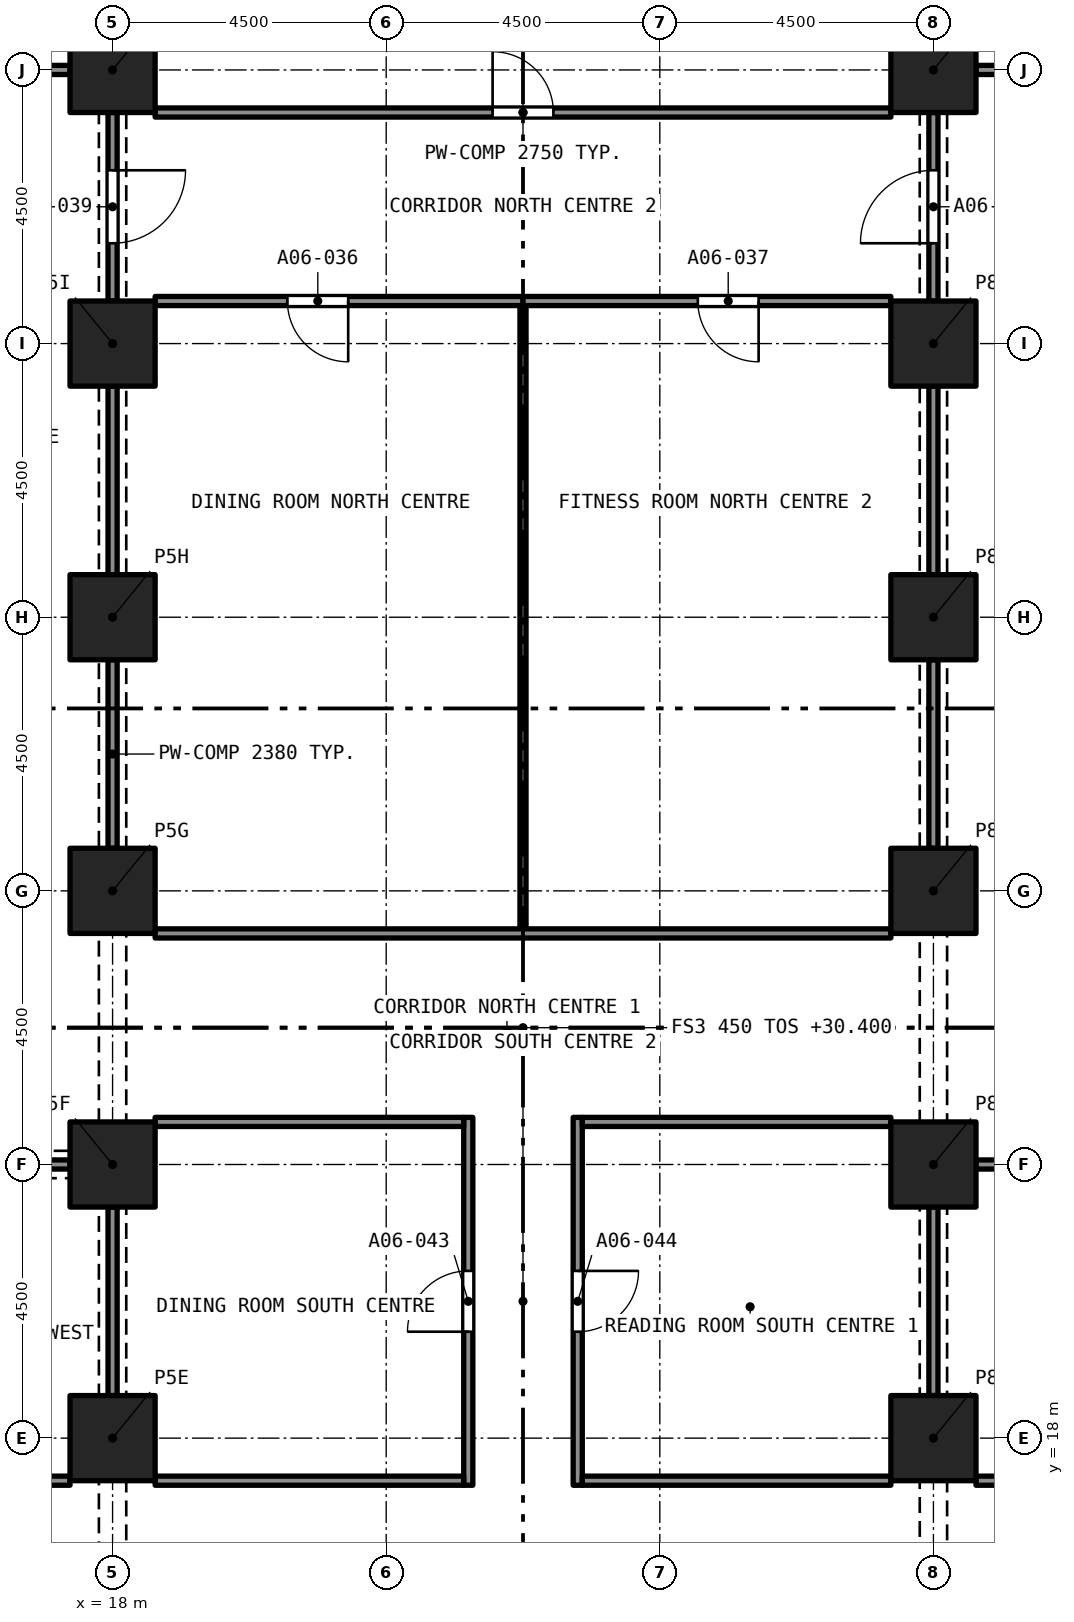
"""IFC4 building model, lengths in metres.
Left out: names, types, materials, properties, quantities, classifications, styles, units other than length and angle.
Written with IfcOpenShell. Run it as: python <this file> out.ifc"""

import sys

from ifc_helpers import new_model, si_unit, direction, frame, frame_2d, origin, origin_2d, place, context, subcontext, project, spatial, rectangle, extrude, element, fill, save


model = new_model("IFC4")
c1 = context("Model", 3, precision=1e-05, world=origin(), true_north=direction((0.0, 1.0)))
c2 = subcontext(c1, "Body", "Model", "MODEL_VIEW")
j1 = project(units=[si_unit("LENGTHUNIT", "METRE"), si_unit("PLANEANGLEUNIT", "RADIAN")], contexts=[c1])
p1 = place(None, origin())
s1 = spatial("IfcSite", under=j1, at=p1, CompositionType="ELEMENT")
p2 = place(p1, origin())
s2 = spatial("IfcBuilding", under=s1, at=p2, CompositionType="ELEMENT")
p3 = place(p2, frame((0.0, 0.0, 30.4)))
s3 = spatial("IfcBuildingStorey", under=s2, at=p3, CompositionType="ELEMENT", Elevation=30.4)
for number, where, z_axis, x_axis in (
    (1, (18.0, 18.0, 0.0), (0.0, 0.0, 1.0), (1.0, 0.0, 0.0)),
    (2, (31.5, 18.0, 0.0), (0.0, 0.0, 1.0), (1.0, 0.0, 0.0)),
    (3, (18.0, 22.5, 0.0), (0.0, 0.0, 1.0), (1.0, 0.0, 0.0)),
    (4, (31.5, 22.5, 0.0), (0.0, 0.0, 1.0), (1.0, 0.0, 0.0)),
    (5, (18.0, 27.0, 0.0), (0.0, 0.0, 1.0), (1.0, 0.0, 0.0)),
    (6, (31.5, 27.0, 0.0), (0.0, 0.0, 1.0), (1.0, 0.0, 0.0)),
    (7, (18.0, 31.5, 0.0), (0.0, 0.0, 1.0), (1.0, 0.0, 0.0)),
    (8, (31.5, 31.5, 0.0), (0.0, 0.0, 1.0), (1.0, 0.0, 0.0)),
    (9, (18.0, 36.0, 0.0), (0.0, 0.0, 1.0), (1.0, 0.0, 0.0)),
    (10, (31.5, 36.0, 0.0), (0.0, 0.0, 1.0), (1.0, 0.0, 0.0)),
    (11, (18.0, 40.5, 0.0), (0.0, 0.0, 1.0), (1.0, 0.0, 0.0)),
    (12, (31.5, 40.5, 0.0), (0.0, 0.0, 1.0), (1.0, 0.0, 0.0)),
):
    element("IfcColumn", number, at=place(p3, frame(where, z_axis=z_axis, x_axis=x_axis)), inside=s3, PredefinedType="COLUMN", context=c2, shape_type="SweptSolid", body=[
        extrude(rectangle(XDim=1.4, YDim=1.4, at=origin_2d()), origin(), (0.0, 0.0, 1.0), 3.2),
    ])
p4 = place(p3, frame((13.5, 40.5, 0.0), z_axis=(0.0, 0.0, 1.0), x_axis=(1.0, 0.0, 0.0)))
e13 = element("IfcWall", 13, at=p4, inside=s3, PredefinedType="PARTITIONING", context=c2, shape_type="SweptSolid", body=[
    extrude(rectangle(XDim=3.8, YDim=0.15, at=frame_2d((1.9, 0.0))), origin(), (0.0, 0.0, 1.0), 2.9),
])
p5 = place(p3, frame((32.2, 40.5, 0.0), z_axis=(0.0, 0.0, 1.0), x_axis=(1.0, 0.0, 0.0)))
e14 = element("IfcWall", 14, at=p5, inside=s3, PredefinedType="PARTITIONING", context=c2, shape_type="SweptSolid", body=[
    extrude(rectangle(XDim=2.225, YDim=0.15, at=frame_2d((1.113, 0.0))), origin(), (0.0, 0.0, 1.0), 2.9),
])
p6 = place(p5, frame((1.05, 0.0, 0.0)))
e15 = element("IfcOpeningElement", 15, at=p6, cuts=e14, PredefinedType="OPENING", context=c2, shape_type="SweptSolid", body=[
    extrude(rectangle(XDim=1.0, YDim=2.1, at=frame_2d((0.5, 1.05))), frame((0.0, 0.085, 0.0), z_axis=(0.0, -1.0, 0.0), x_axis=(1.0, 0.0, 0.0)), (0.0, 0.0, 1.0), 0.17),
])
p7 = place(p3, frame((18.7, 39.8, 0.0), z_axis=(0.0, 0.0, 1.0), x_axis=(1.0, 0.0, 0.0)))
e16 = element("IfcWall", 16, at=p7, inside=s3, PredefinedType="PARTITIONING", context=c2, shape_type="SweptSolid", body=[
    extrude(rectangle(XDim=12.1, YDim=0.15, at=frame_2d((6.05, 0.0))), origin(), (0.0, 0.0, 1.0), 2.75),
])
p8 = place(p7, frame((5.55, 0.0, 0.0)))
e17 = element("IfcOpeningElement", 17, at=p8, cuts=e16, PredefinedType="OPENING", context=c2, shape_type="SweptSolid", body=[
    extrude(rectangle(XDim=1.0, YDim=2.1, at=frame_2d((0.5, 1.05))), frame((0.0, 0.085, 0.0), z_axis=(0.0, -1.0, 0.0), x_axis=(1.0, 0.0, 0.0)), (0.0, 0.0, 1.0), 0.17),
])
p9 = place(p3, frame((24.75, 36.7, 0.0), z_axis=(0.0, 0.0, 1.0), x_axis=(-1.0, 0.0, 0.0)))
e18 = element("IfcWall", 18, at=p9, inside=s3, PredefinedType="PARTITIONING", context=c2, shape_type="SweptSolid", body=[
    extrude(rectangle(XDim=6.05, YDim=0.15, at=frame_2d((3.025, 0.0))), origin(), (0.0, 0.0, 1.0), 2.75),
])
p10 = place(p9, frame((2.875, 0.0, 0.0)))
e19 = element("IfcOpeningElement", 19, at=p10, cuts=e18, PredefinedType="OPENING", context=c2, shape_type="SweptSolid", body=[
    extrude(rectangle(XDim=1.0, YDim=2.1, at=frame_2d((0.5, 1.05))), frame((0.0, 0.085, 0.0), z_axis=(0.0, -1.0, 0.0), x_axis=(1.0, 0.0, 0.0)), (0.0, 0.0, 1.0), 0.17),
])
p11 = place(p3, frame((30.8, 36.7, 0.0), z_axis=(0.0, 0.0, 1.0), x_axis=(-1.0, 0.0, 0.0)))
e20 = element("IfcWall", 20, at=p11, inside=s3, PredefinedType="PARTITIONING", context=c2, shape_type="SweptSolid", body=[
    extrude(rectangle(XDim=6.05, YDim=0.15, at=frame_2d((3.025, 0.0))), origin(), (0.0, 0.0, 1.0), 2.75),
])
p12 = place(p11, frame((2.175, 0.0, 0.0)))
e21 = element("IfcOpeningElement", 21, at=p12, cuts=e20, PredefinedType="OPENING", context=c2, shape_type="SweptSolid", body=[
    extrude(rectangle(XDim=1.0, YDim=2.1, at=frame_2d((0.5, 1.05))), frame((0.0, 0.085, 0.0), z_axis=(0.0, -1.0, 0.0), x_axis=(1.0, 0.0, 0.0)), (0.0, 0.0, 1.0), 0.17),
])
p13 = place(p3, frame((31.5, 36.7, 0.0), z_axis=(0.0, 0.0, 1.0), x_axis=(0.0, 1.0, 0.0)))
e22 = element("IfcWall", 22, at=p13, inside=s3, PredefinedType="PARTITIONING", context=c2, shape_type="SweptSolid", body=[
    extrude(rectangle(XDim=3.1, YDim=0.15, at=frame_2d((1.55, 0.0))), origin(), (0.0, 0.0, 1.0), 2.38),
])
p14 = place(p13, frame((0.95, 0.0, 0.0)))
e23 = element("IfcOpeningElement", 23, at=p14, cuts=e22, PredefinedType="OPENING", context=c2, shape_type="SweptSolid", body=[
    extrude(rectangle(XDim=1.2, YDim=2.1, at=frame_2d((0.6, 1.05))), frame((0.0, 0.085, 0.0), z_axis=(0.0, -1.0, 0.0), x_axis=(1.0, 0.0, 0.0)), (0.0, 0.0, 1.0), 0.17),
])
p15 = place(p3, frame((18.0, 39.8, 0.0), z_axis=(0.0, 0.0, 1.0), x_axis=(0.0, -1.0, 0.0)))
e24 = element("IfcWall", 24, at=p15, inside=s3, PredefinedType="PARTITIONING", context=c2, shape_type="SweptSolid", body=[
    extrude(rectangle(XDim=3.1, YDim=0.15, at=frame_2d((1.55, 0.0))), origin(), (0.0, 0.0, 1.0), 2.38),
])
p16 = place(p15, frame((0.95, 0.0, 0.0)))
e25 = element("IfcOpeningElement", 25, at=p16, cuts=e24, PredefinedType="OPENING", context=c2, shape_type="SweptSolid", body=[
    extrude(rectangle(XDim=1.2, YDim=2.1, at=frame_2d((0.6, 1.05))), frame((0.0, 0.085, 0.0), z_axis=(0.0, -1.0, 0.0), x_axis=(1.0, 0.0, 0.0)), (0.0, 0.0, 1.0), 0.17),
])
p17 = place(p3, frame((23.85, 17.225, 0.0), z_axis=(0.0, 0.0, 1.0), x_axis=(0.0, 1.0, 0.0)))
e26 = element("IfcWall", 26, at=p17, inside=s3, PredefinedType="PARTITIONING", context=c2, shape_type="SweptSolid", body=[
    extrude(rectangle(XDim=6.05, YDim=0.15, at=frame_2d((3.025, 0.0))), origin(), (0.0, 0.0, 1.0), 2.75),
])
p18 = place(p17, frame((2.525, 0.0, 0.0)))
e27 = element("IfcOpeningElement", 27, at=p18, cuts=e26, PredefinedType="OPENING", context=c2, shape_type="SweptSolid", body=[
    extrude(rectangle(XDim=1.0, YDim=2.1, at=frame_2d((0.5, 1.05))), frame((0.0, 0.085, 0.0), z_axis=(0.0, -1.0, 0.0), x_axis=(1.0, 0.0, 0.0)), (0.0, 0.0, 1.0), 0.17),
])
p19 = place(p3, frame((25.65, 23.275, 0.0), z_axis=(0.0, 0.0, 1.0), x_axis=(0.0, -1.0, 0.0)))
e28 = element("IfcWall", 28, at=p19, inside=s3, PredefinedType="PARTITIONING", context=c2, shape_type="SweptSolid", body=[
    extrude(rectangle(XDim=6.05, YDim=0.15, at=frame_2d((3.025, 0.0))), origin(), (0.0, 0.0, 1.0), 2.75),
])
p20 = place(p19, frame((2.525, 0.0, 0.0)))
e29 = element("IfcOpeningElement", 29, at=p20, cuts=e28, PredefinedType="OPENING", context=c2, shape_type="SweptSolid", body=[
    extrude(rectangle(XDim=1.0, YDim=2.1, at=frame_2d((0.5, 1.05))), frame((0.0, 0.085, 0.0), z_axis=(0.0, -1.0, 0.0), x_axis=(1.0, 0.0, 0.0)), (0.0, 0.0, 1.0), 0.17),
])
for number, where, z_axis, x_axis in (
    (30, (18.7, 17.3, 0.0), (0.0, 0.0, 1.0), (1.0, 0.0, 0.0)),
    (31, (25.725, 17.3, 0.0), (0.0, 0.0, 1.0), (1.0, 0.0, 0.0)),
):
    element("IfcWall", number, at=place(p3, frame(where, z_axis=z_axis, x_axis=x_axis)), inside=s3, PredefinedType="PARTITIONING", context=c2, shape_type="SweptSolid", body=[
        extrude(rectangle(XDim=5.075, YDim=0.15, at=frame_2d((2.538, 0.0))), origin(), (0.0, 0.0, 1.0), 2.75),
    ])
p21 = place(p3, frame((32.2, 17.3, 0.0), z_axis=(0.0, 0.0, 1.0), x_axis=(1.0, 0.0, 0.0)))
e32 = element("IfcWall", 32, at=p21, inside=s3, PredefinedType="PARTITIONING", context=c2, shape_type="SweptSolid", body=[
    extrude(rectangle(XDim=7.15, YDim=0.15, at=frame_2d((3.575, 0.0))), origin(), (0.0, 0.0, 1.0), 2.9),
])
p22 = place(p21, frame((2.775, 0.0, 0.0)))
e33 = element("IfcOpeningElement", 33, at=p22, cuts=e32, PredefinedType="OPENING", context=c2, shape_type="SweptSolid", body=[
    extrude(rectangle(XDim=0.9, YDim=2.1, at=frame_2d((0.45, 1.05))), frame((0.0, 0.085, 0.0), z_axis=(0.0, -1.0, 0.0), x_axis=(1.0, 0.0, 0.0)), (0.0, 0.0, 1.0), 0.17),
])
p23 = place(p3, frame((10.15, 17.3, 0.0), z_axis=(0.0, 0.0, 1.0), x_axis=(1.0, 0.0, 0.0)))
e34 = element("IfcWall", 34, at=p23, inside=s3, PredefinedType="PARTITIONING", context=c2, shape_type="SweptSolid", body=[
    extrude(rectangle(XDim=7.15, YDim=0.15, at=frame_2d((3.575, 0.0))), origin(), (0.0, 0.0, 1.0), 2.9),
])
p24 = place(p23, frame((3.475, 0.0, 0.0)))
e35 = element("IfcOpeningElement", 35, at=p24, cuts=e34, PredefinedType="OPENING", context=c2, shape_type="SweptSolid", body=[
    extrude(rectangle(XDim=0.9, YDim=2.1, at=frame_2d((0.45, 1.05))), frame((0.0, 0.085, 0.0), z_axis=(0.0, -1.0, 0.0), x_axis=(1.0, 0.0, 0.0)), (0.0, 0.0, 1.0), 0.17),
])
p25 = place(p3, frame((24.75, 26.375, 0.0), z_axis=(0.0, 0.0, 1.0), x_axis=(0.0, 1.0, 0.0)))
e36 = element("IfcWall", 36, at=p25, inside=s3, PredefinedType="PARTITIONING", context=c2, shape_type="SweptSolid", body=[
    extrude(rectangle(XDim=10.25, YDim=0.1, at=frame_2d((5.125, 0.0))), origin(), (0.0, 0.0, 1.0), 2.75),
])
for number, where, z_axis, x_axis in (
    (37, (18.0, 27.7, 0.0), (0.0, 0.0, 1.0), (0.0, 1.0, 0.0)),
    (38, (18.0, 32.2, 0.0), (0.0, 0.0, 1.0), (0.0, 1.0, 0.0)),
):
    element("IfcWall", number, at=place(p3, frame(where, z_axis=z_axis, x_axis=x_axis)), inside=s3, PredefinedType="PARTITIONING", context=c2, shape_type="SweptSolid", body=[
        extrude(rectangle(XDim=3.1, YDim=0.15, at=frame_2d((1.55, 0.0))), origin(), (0.0, 0.0, 1.0), 2.38),
    ])
p26 = place(p3, frame((18.7, 26.3, 0.0), z_axis=(0.0, 0.0, 1.0), x_axis=(1.0, 0.0, 0.0)))
e39 = element("IfcWall", 39, at=p26, inside=s3, PredefinedType="PARTITIONING", context=c2, shape_type="SweptSolid", body=[
    extrude(rectangle(XDim=12.1, YDim=0.15, at=frame_2d((6.05, 0.0))), origin(), (0.0, 0.0, 1.0), 2.75),
])
for number, where, z_axis, x_axis in (
    (40, (31.5, 32.2, 0.0), (0.0, 0.0, 1.0), (0.0, 1.0, 0.0)),
    (41, (31.5, 27.7, 0.0), (0.0, 0.0, 1.0), (0.0, 1.0, 0.0)),
):
    element("IfcWall", number, at=place(p3, frame(where, z_axis=z_axis, x_axis=x_axis)), inside=s3, PredefinedType="PARTITIONING", context=c2, shape_type="SweptSolid", body=[
        extrude(rectangle(XDim=3.1, YDim=0.15, at=frame_2d((1.55, 0.0))), origin(), (0.0, 0.0, 1.0), 2.38),
    ])
p27 = place(p3, frame((18.7, 23.2, 0.0), z_axis=(0.0, 0.0, 1.0), x_axis=(1.0, 0.0, 0.0)))
e42 = element("IfcWall", 42, at=p27, inside=s3, PredefinedType="PARTITIONING", context=c2, shape_type="SweptSolid", body=[
    extrude(rectangle(XDim=5.075, YDim=0.15, at=frame_2d((2.538, 0.0))), origin(), (0.0, 0.0, 1.0), 2.75),
])
p28 = place(p3, frame((18.0, 18.7, 0.0), z_axis=(0.0, 0.0, 1.0), x_axis=(0.0, 1.0, 0.0)))
e43 = element("IfcWall", 43, at=p28, inside=s3, PredefinedType="PARTITIONING", context=c2, shape_type="SweptSolid", body=[
    extrude(rectangle(XDim=3.1, YDim=0.15, at=frame_2d((1.55, 0.0))), origin(), (0.0, 0.0, 1.0), 2.38),
])
p29 = place(p3, frame((25.725, 23.2, 0.0), z_axis=(0.0, 0.0, 1.0), x_axis=(1.0, 0.0, 0.0)))
e44 = element("IfcWall", 44, at=p29, inside=s3, PredefinedType="PARTITIONING", context=c2, shape_type="SweptSolid", body=[
    extrude(rectangle(XDim=5.075, YDim=0.15, at=frame_2d((2.538, 0.0))), origin(), (0.0, 0.0, 1.0), 2.75),
])
p30 = place(p3, frame((31.5, 18.7, 0.0), z_axis=(0.0, 0.0, 1.0), x_axis=(0.0, 1.0, 0.0)))
e45 = element("IfcWall", 45, at=p30, inside=s3, PredefinedType="PARTITIONING", context=c2, shape_type="SweptSolid", body=[
    extrude(rectangle(XDim=3.1, YDim=0.15, at=frame_2d((1.55, 0.0))), origin(), (0.0, 0.0, 1.0), 2.38),
])
p31 = place(p3, frame((32.2, 22.5, 0.0), z_axis=(0.0, 0.0, 1.0), x_axis=(1.0, 0.0, 0.0)))
e46 = element("IfcWall", 46, at=p31, inside=s3, PredefinedType="PARTITIONING", context=c2, shape_type="SweptSolid", body=[
    extrude(rectangle(XDim=9.725, YDim=0.15, at=frame_2d((4.863, 0.0))), origin(), (0.0, 0.0, 1.0), 2.9),
])
p32 = place(p3, frame((14.2, 22.5, 0.0), z_axis=(0.0, 0.0, 1.0), x_axis=(1.0, 0.0, 0.0)))
e47 = element("IfcWall", 47, at=p32, inside=s3, PredefinedType="PARTITIONING", context=c2, shape_type="SweptSolid", body=[
    extrude(rectangle(XDim=3.1, YDim=0.15, at=frame_2d((1.55, 0.0))), origin(), (0.0, 0.0, 1.0), 2.38),
])
p33 = place(p8, origin())
e48 = element("IfcDoor", 48, at=p33, inside=s3, OperationType="SINGLE_SWING_RIGHT", PredefinedType="DOOR", context=c2, shape_type="SweptSolid", body=[
    extrude(rectangle(XDim=1.0, YDim=2.1, at=frame_2d((0.5, 1.05))), frame((0.0, 0.025, 0.0), z_axis=(0.0, -1.0, 0.0), x_axis=(1.0, 0.0, 0.0)), (0.0, 0.0, 1.0), 0.05),
])
fill(e17, e48)
p34 = place(p10, origin())
e49 = element("IfcDoor", 49, at=p34, inside=s3, OperationType="SINGLE_SWING_RIGHT", PredefinedType="DOOR", context=c2, shape_type="SweptSolid", body=[
    extrude(rectangle(XDim=1.0, YDim=2.1, at=frame_2d((0.5, 1.05))), frame((0.0, 0.025, 0.0), z_axis=(0.0, -1.0, 0.0), x_axis=(1.0, 0.0, 0.0)), (0.0, 0.0, 1.0), 0.05),
])
fill(e19, e49)
p35 = place(p12, origin())
e50 = element("IfcDoor", 50, at=p35, inside=s3, OperationType="SINGLE_SWING_LEFT", PredefinedType="DOOR", context=c2, shape_type="SweptSolid", body=[
    extrude(rectangle(XDim=1.0, YDim=2.1, at=frame_2d((0.5, 1.05))), frame((0.0, 0.025, 0.0), z_axis=(0.0, -1.0, 0.0), x_axis=(1.0, 0.0, 0.0)), (0.0, 0.0, 1.0), 0.05),
])
fill(e21, e50)
p36 = place(p14, origin())
e51 = element("IfcDoor", 51, at=p36, inside=s3, OperationType="SINGLE_SWING_LEFT", PredefinedType="DOOR", context=c2, shape_type="SweptSolid", body=[
    extrude(rectangle(XDim=1.2, YDim=2.1, at=frame_2d((0.6, 1.05))), frame((0.0, 0.025, 0.0), z_axis=(0.0, -1.0, 0.0), x_axis=(1.0, 0.0, 0.0)), (0.0, 0.0, 1.0), 0.05),
])
fill(e23, e51)
p37 = place(p16, origin())
e52 = element("IfcDoor", 52, at=p37, inside=s3, OperationType="SINGLE_SWING_LEFT", PredefinedType="DOOR", context=c2, shape_type="SweptSolid", body=[
    extrude(rectangle(XDim=1.2, YDim=2.1, at=frame_2d((0.6, 1.05))), frame((0.0, 0.025, 0.0), z_axis=(0.0, -1.0, 0.0), x_axis=(1.0, 0.0, 0.0)), (0.0, 0.0, 1.0), 0.05),
])
fill(e25, e52)
p38 = place(p18, origin())
e53 = element("IfcDoor", 53, at=p38, inside=s3, OperationType="SINGLE_SWING_RIGHT", PredefinedType="DOOR", context=c2, shape_type="SweptSolid", body=[
    extrude(rectangle(XDim=1.0, YDim=2.1, at=frame_2d((0.5, 1.05))), frame((0.0, 0.025, 0.0), z_axis=(0.0, -1.0, 0.0), x_axis=(1.0, 0.0, 0.0)), (0.0, 0.0, 1.0), 0.05),
])
fill(e27, e53)
p39 = place(p20, origin())
e54 = element("IfcDoor", 54, at=p39, inside=s3, OperationType="SINGLE_SWING_RIGHT", PredefinedType="DOOR", context=c2, shape_type="SweptSolid", body=[
    extrude(rectangle(XDim=1.0, YDim=2.1, at=frame_2d((0.5, 1.05))), frame((0.0, 0.025, 0.0), z_axis=(0.0, -1.0, 0.0), x_axis=(1.0, 0.0, 0.0)), (0.0, 0.0, 1.0), 0.05),
])
fill(e29, e54)
save(model, sys.argv[1])
